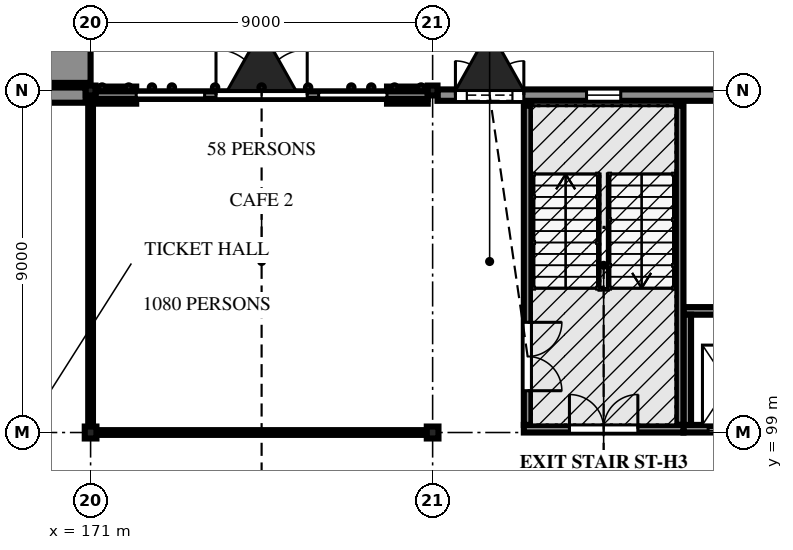
"""IFC4 building model, lengths in metres.
Left out: names, types, materials, properties, quantities, classifications, styles, units other than length and angle.
Written with IfcOpenShell. Run it as: python <this file> out.ifc"""

import sys

from ifc_helpers import new_model, si_unit, direction, frame, frame_2d, origin, origin_2d, place, context, subcontext, project, spatial, polyline, rectangle, i_section, outline, extrude, element, fill, save


model = new_model("IFC4")
c1 = context("Model", 3, precision=1e-05, world=origin(), true_north=direction((0.0, 1.0)))
c2 = subcontext(c1, "Body", "Model", "MODEL_VIEW")
j1 = project(units=[si_unit("LENGTHUNIT", "METRE"), si_unit("PLANEANGLEUNIT", "RADIAN")], contexts=[c1])
p1 = place(None, origin())
s1 = spatial("IfcSite", under=j1, at=p1, CompositionType="ELEMENT")
p2 = place(p1, origin())
s2 = spatial("IfcBuilding", under=s1, at=p2, CompositionType="ELEMENT")
p3 = place(p2, origin())
s3 = spatial("IfcBuildingStorey", under=s2, at=p3, CompositionType="ELEMENT", Elevation=0.0)
p4 = place(p3, frame((171.0, 99.0, -2.1), z_axis=(0.0, 0.0, 1.0), x_axis=(1.0, 0.0, 0.0)))
e1 = element("IfcColumn", 1, at=p4, inside=s3, PredefinedType="COLUMN", context=c2, shape_type="SweptSolid", body=[
    extrude(i_section(OverallWidth=0.307, OverallDepth=0.314, WebThickness=0.012, FlangeThickness=0.019, FilletRadius=0.015, at=origin_2d()), origin(), (0.0, 0.0, 1.0), 9.6),
])
p5 = place(p3, frame((171.0, 108.0, -2.1), z_axis=(0.0, 0.0, 1.0), x_axis=(1.0, 0.0, 0.0)))
e2 = element("IfcColumn", 2, at=p5, inside=s3, PredefinedType="COLUMN", context=c2, shape_type="SweptSolid", body=[
    extrude(i_section(OverallWidth=0.256, OverallDepth=0.26, WebThickness=0.01, FlangeThickness=0.017, FilletRadius=0.013, at=origin_2d()), origin(), (0.0, 0.0, 1.0), 9.6),
])
p6 = place(p3, frame((180.0, 99.0, -2.1), z_axis=(0.0, 0.0, 1.0), x_axis=(1.0, 0.0, 0.0)))
e3 = element("IfcColumn", 3, at=p6, inside=s3, PredefinedType="COLUMN", context=c2, shape_type="SweptSolid", body=[
    extrude(i_section(OverallWidth=0.307, OverallDepth=0.314, WebThickness=0.012, FlangeThickness=0.019, FilletRadius=0.015, at=origin_2d()), origin(), (0.0, 0.0, 1.0), 9.6),
])
p7 = place(p3, frame((180.0, 108.0, -2.1), z_axis=(0.0, 0.0, 1.0), x_axis=(1.0, 0.0, 0.0)))
e4 = element("IfcColumn", 4, at=p7, inside=s3, PredefinedType="COLUMN", context=c2, shape_type="SweptSolid", body=[
    extrude(i_section(OverallWidth=0.256, OverallDepth=0.26, WebThickness=0.01, FlangeThickness=0.017, FilletRadius=0.013, at=origin_2d()), origin(), (0.0, 0.0, 1.0), 9.6),
])
p8 = place(p3, frame((162.128, 107.878, 0.0), z_axis=(0.0, 0.0, 1.0), x_axis=(1.0, 0.0, 0.0)))
e5 = element("IfcWall", 5, at=p8, inside=s3, PredefinedType="SOLIDWALL", context=c2, shape_type="SweptSolid", body=[
    extrude(rectangle(XDim=8.744, YDim=0.4, at=frame_2d((4.372, 0.0))), origin(), (0.0, 0.0, 1.0), 7.5),
])
p9 = place(p8, frame((2.872, 0.0, 0.0)))
e6 = element("IfcOpeningElement", 6, at=p9, cuts=e5, PredefinedType="OPENING", context=c2, shape_type="SweptSolid", body=[
    extrude(rectangle(XDim=3.0, YDim=3.6, at=frame_2d((1.5, 1.8))), frame((0.0, 0.21, 0.0), z_axis=(0.0, -1.0, 0.0), x_axis=(1.0, 0.0, 0.0)), (0.0, 0.0, 1.0), 0.42),
])
p10 = place(p3, frame((171.128, 107.878, 0.0), z_axis=(0.0, 0.0, 1.0), x_axis=(1.0, 0.0, 0.0)))
e7 = element("IfcWall", 7, at=p10, inside=s3, PredefinedType="SOLIDWALL", context=c2, shape_type="SweptSolid", body=[
    extrude(rectangle(XDim=1.072, YDim=0.45, at=frame_2d((0.536, 0.0))), origin(), (0.0, 0.0, 1.0), 4.5),
])
p11 = place(p3, frame((174.0, 107.878, 0.0), z_axis=(0.0, 0.0, 1.0), x_axis=(1.0, 0.0, 0.0)))
e8 = element("IfcWall", 8, at=p11, inside=s3, PredefinedType="ELEMENTEDWALL", context=c2, shape_type="SweptSolid", body=[
    extrude(rectangle(XDim=3.0, YDim=0.15, at=frame_2d((1.5, 0.0))), origin(), (0.0, 0.0, 1.0), 4.5),
])
p12 = place(p11, frame((0.3, 0.0, 0.0)))
e9 = element("IfcOpeningElement", 9, at=p12, cuts=e8, PredefinedType="OPENING", context=c2, shape_type="SweptSolid", body=[
    extrude(rectangle(XDim=2.4, YDim=2.7, at=frame_2d((1.2, 1.35))), frame((0.0, 0.085, 0.0), z_axis=(0.0, -1.0, 0.0), x_axis=(1.0, 0.0, 0.0)), (0.0, 0.0, 1.0), 0.17),
])
p13 = place(p3, frame((178.8, 107.878, 0.0), z_axis=(0.0, 0.0, 1.0), x_axis=(1.0, 0.0, 0.0)))
e10 = element("IfcWall", 10, at=p13, inside=s3, PredefinedType="SOLIDWALL", context=c2, shape_type="SweptSolid", body=[
    extrude(rectangle(XDim=1.072, YDim=0.45, at=frame_2d((0.536, 0.0))), origin(), (0.0, 0.0, 1.0), 4.5),
])
p14 = place(p3, frame((171.128, 107.878, 4.9), z_axis=(0.0, 0.0, 1.0), x_axis=(1.0, 0.0, 0.0)))
e11 = element("IfcWall", 11, at=p14, inside=s3, PredefinedType="SOLIDWALL", context=c2, shape_type="SweptSolid", body=[
    extrude(rectangle(XDim=8.744, YDim=0.2, at=frame_2d((4.372, 0.0))), origin(), (0.0, 0.0, 1.0), 1.792),
])
p15 = place(p3, frame((180.128, 107.878, 0.0), z_axis=(0.0, 0.0, 1.0), x_axis=(1.0, 0.0, 0.0)))
e12 = element("IfcWall", 12, at=p15, inside=s3, PredefinedType="SOLIDWALL", context=c2, shape_type="SweptSolid", body=[
    extrude(rectangle(XDim=8.744, YDim=0.3, at=frame_2d((4.372, 0.0))), origin(), (0.0, 0.0, 1.0), 6.692),
])
p16 = place(p15, frame((0.472, 0.0, 0.0)))
e13 = element("IfcOpeningElement", 13, at=p16, cuts=e12, PredefinedType="OPENING", context=c2, shape_type="SweptSolid", body=[
    extrude(rectangle(XDim=1.8, YDim=2.4, at=frame_2d((0.9, 1.2))), frame((0.0, 0.16, 0.0), z_axis=(0.0, -1.0, 0.0), x_axis=(1.0, 0.0, 0.0)), (0.0, 0.0, 1.0), 0.32),
])
p17 = place(p15, frame((0.772, 0.0, 2.55)))
e14 = element("IfcOpeningElement", 14, at=p17, cuts=e12, PredefinedType="OPENING", context=c2, shape_type="SweptSolid", body=[
    extrude(rectangle(XDim=1.2, YDim=0.6, at=frame_2d((0.6, 0.3))), frame((0.0, 0.16, 0.0), z_axis=(0.0, -1.0, 0.0), x_axis=(1.0, 0.0, 0.0)), (0.0, 0.0, 1.0), 0.32),
])
p18 = place(p15, frame((3.922, 0.0, 1.2)))
e15 = element("IfcOpeningElement", 15, at=p18, cuts=e12, PredefinedType="OPENING", context=c2, shape_type="SweptSolid", body=[
    extrude(rectangle(XDim=0.9, YDim=1.8, at=frame_2d((0.45, 0.9))), frame((0.0, 0.16, 0.0), z_axis=(0.0, -1.0, 0.0), x_axis=(1.0, 0.0, 0.0)), (0.0, 0.0, 1.0), 0.32),
])
p19 = place(p3, frame((168.0, 108.7, -2.1), z_axis=(0.0, 0.0, 1.0), x_axis=(1.0, 0.0, 0.0)))
e16 = element("IfcWall", 16, at=p19, inside=s3, PredefinedType="SOLIDWALL", context=c2, shape_type="SweptSolid", body=[
    extrude(rectangle(XDim=3.0, YDim=1.0, at=frame_2d((1.5, 0.0))), origin(), (0.0, 0.0, 1.0), 26.1),
])
p20 = place(p3, frame((182.4, 99.1, 0.0), z_axis=(0.0, 0.0, 1.0), x_axis=(1.0, 0.0, 0.0)))
e17 = element("IfcWall", 17, at=p20, inside=s3, PredefinedType="SOLIDWALL", context=c2, shape_type="SweptSolid", body=[
    extrude(rectangle(XDim=4.2, YDim=0.2, at=frame_2d((2.1, 0.0))), origin(), (0.0, 0.0, 1.0), 6.757),
])
p21 = place(p20, frame((1.2, 0.0, 0.0)))
e18 = element("IfcOpeningElement", 18, at=p21, cuts=e17, PredefinedType="OPENING", context=c2, shape_type="SweptSolid", body=[
    extrude(rectangle(XDim=1.8, YDim=2.1, at=frame_2d((0.9, 1.05))), frame((0.0, 0.11, 0.0), z_axis=(0.0, -1.0, 0.0), x_axis=(1.0, 0.0, 0.0)), (0.0, 0.0, 1.0), 0.22),
])
p22 = place(p3, frame((182.5, 99.2, 0.0), z_axis=(0.0, 0.0, 1.0), x_axis=(0.0, 1.0, 0.0)))
e19 = element("IfcWall", 19, at=p22, inside=s3, PredefinedType="SOLIDWALL", context=c2, shape_type="SweptSolid", body=[
    extrude(rectangle(XDim=8.4, YDim=0.2, at=frame_2d((4.2, 0.0))), origin(), (0.0, 0.0, 1.0), 6.757),
])
p23 = place(p22, frame((0.9, 0.0, 0.0)))
e20 = element("IfcOpeningElement", 20, at=p23, cuts=e19, PredefinedType="OPENING", context=c2, shape_type="SweptSolid", body=[
    extrude(rectangle(XDim=1.8, YDim=2.1, at=frame_2d((0.9, 1.05))), frame((0.0, 0.11, 0.0), z_axis=(0.0, -1.0, 0.0), x_axis=(1.0, 0.0, 0.0)), (0.0, 0.0, 1.0), 0.22),
])
p24 = place(p3, frame((186.5, 99.2, 0.0), z_axis=(0.0, 0.0, 1.0), x_axis=(0.0, 1.0, 0.0)))
e21 = element("IfcWall", 21, at=p24, inside=s3, PredefinedType="SOLIDWALL", context=c2, shape_type="SweptSolid", body=[
    extrude(rectangle(XDim=8.4, YDim=0.2, at=frame_2d((4.2, 0.0))), origin(), (0.0, 0.0, 1.0), 6.757),
])
p25 = place(p3, frame((186.602, 99.1, -1.6), z_axis=(0.0, 0.0, 1.0), x_axis=(1.0, 0.0, 0.0)))
e22 = element("IfcWall", 22, at=p25, inside=s3, PredefinedType="SOLIDWALL", context=c2, shape_type="SweptSolid", body=[
    extrude(rectangle(XDim=2.398, YDim=0.2, at=frame_2d((1.199, 0.0))), origin(), (0.0, 0.0, 1.0), 8.357),
])
p26 = place(p25, frame((0.648, 0.0, 1.6)))
e23 = element("IfcOpeningElement", 23, at=p26, cuts=e22, PredefinedType="OPENING", context=c2, shape_type="SweptSolid", body=[
    extrude(rectangle(XDim=1.1, YDim=2.1, at=frame_2d((0.55, 1.05))), frame((0.0, 0.11, 0.0), z_axis=(0.0, -1.0, 0.0), x_axis=(1.0, 0.0, 0.0)), (0.0, 0.0, 1.0), 0.22),
])
p27 = place(p3, frame((186.602, 102.2, -1.6), z_axis=(0.0, 0.0, 1.0), x_axis=(1.0, 0.0, 0.0)))
e24 = element("IfcWall", 24, at=p27, inside=s3, PredefinedType="SOLIDWALL", context=c2, shape_type="SweptSolid", body=[
    extrude(rectangle(XDim=2.398, YDim=0.2, at=frame_2d((1.199, 0.0))), origin(), (0.0, 0.0, 1.0), 8.357),
])
p28 = place(p3, frame((186.7, 99.2, -1.6), z_axis=(0.0, 0.0, 1.0), x_axis=(0.0, 1.0, 0.0)))
e25 = element("IfcWall", 25, at=p28, inside=s3, PredefinedType="SOLIDWALL", context=c2, shape_type="SweptSolid", body=[
    extrude(rectangle(XDim=2.9, YDim=0.2, at=frame_2d((1.45, 0.0))), origin(), (0.0, 0.0, 1.0), 8.357),
])
p29 = place(p3, frame((171.154, 99.0, 0.0), z_axis=(0.0, 0.0, 1.0), x_axis=(1.0, 0.0, 0.0)))
e26 = element("IfcWall", 26, at=p29, inside=s3, PredefinedType="PARTITIONING", context=c2, shape_type="SweptSolid", body=[
    extrude(rectangle(XDim=8.692, YDim=0.125, at=frame_2d((4.346, 0.0))), origin(), (0.0, 0.0, 1.0), 6.757),
])
p30 = place(p3, frame((171.0, 107.87, 0.0), z_axis=(0.0, 0.0, 1.0), x_axis=(0.0, -1.0, 0.0)))
e27 = element("IfcWall", 27, at=p30, inside=s3, PredefinedType="PARTITIONING", context=c2, shape_type="SweptSolid", body=[
    extrude(rectangle(XDim=8.713, YDim=0.125, at=frame_2d((4.356, 0.0))), origin(), (0.0, 0.0, 1.0), 6.757),
])
p31 = place(p12, origin())
e28 = element("IfcDoor", 28, at=p31, inside=s3, OperationType="DOUBLE_DOOR_SINGLE_SWING", PredefinedType="DOOR", context=c2, shape_type="SweptSolid", body=[
    extrude(outline(polyline([(0.0, 0.0), (0.07, 0.0), (0.07, 2.63), (2.33, 2.63), (2.33, 0.0), (2.4, 0.0), (2.4, 2.7), (0.0, 2.7), (0.0, 0.0)])), frame((0.0, 0.025, 0.0), z_axis=(0.0, -1.0, 0.0), x_axis=(1.0, 0.0, 0.0)), (0.0, 0.0, 1.0), 0.05),
    extrude(outline(polyline([(0.074, 0.01), (1.197, 0.01), (1.197, 2.626), (0.074, 2.626), (0.074, 0.01)]), holes=[polyline([(0.164, 0.31), (1.107, 0.31), (1.107, 2.536), (0.164, 2.536), (0.164, 0.31)])]), frame((0.0, 0.017, 0.0), z_axis=(0.0, -1.0, 0.0), x_axis=(1.0, 0.0, 0.0)), (0.0, 0.0, 1.0), 0.035),
    extrude(rectangle(XDim=0.943, YDim=2.226, at=frame_2d((0.635, 1.423))), frame((0.0, 0.006, 0.0), z_axis=(0.0, -1.0, 0.0), x_axis=(1.0, 0.0, 0.0)), (0.0, 0.0, 1.0), 0.012),
    extrude(outline(polyline([(1.203, 0.01), (2.326, 0.01), (2.326, 2.626), (1.203, 2.626), (1.203, 0.01)]), holes=[polyline([(1.293, 0.31), (2.236, 0.31), (2.236, 2.536), (1.293, 2.536), (1.293, 0.31)])]), frame((0.0, 0.017, 0.0), z_axis=(0.0, -1.0, 0.0), x_axis=(1.0, 0.0, 0.0)), (0.0, 0.0, 1.0), 0.035),
    extrude(rectangle(XDim=0.943, YDim=2.226, at=frame_2d((1.764, 1.423))), frame((0.0, 0.006, 0.0), z_axis=(0.0, -1.0, 0.0), x_axis=(1.0, 0.0, 0.0)), (0.0, 0.0, 1.0), 0.012),
])
fill(e9, e28)
p32 = place(p16, origin())
e29 = element("IfcDoor", 29, at=p32, inside=s3, OperationType="DOUBLE_DOOR_SINGLE_SWING", PredefinedType="DOOR", context=c2, shape_type="SweptSolid", body=[
    extrude(outline(polyline([(0.0, 0.0), (0.07, 0.0), (0.07, 2.33), (1.73, 2.33), (1.73, 0.0), (1.8, 0.0), (1.8, 2.4), (0.0, 2.4), (0.0, 0.0)])), frame((0.0, 0.025, 0.0), z_axis=(0.0, -1.0, 0.0), x_axis=(1.0, 0.0, 0.0)), (0.0, 0.0, 1.0), 0.05),
    extrude(outline(polyline([(0.074, 0.01), (0.897, 0.01), (0.897, 2.326), (0.074, 2.326), (0.074, 0.01)]), holes=[polyline([(0.194, 0.16), (0.777, 0.16), (0.777, 1.01), (0.194, 1.01), (0.194, 0.16)]), polyline([(0.335, 1.16), (0.635, 1.16), (0.635, 1.76), (0.335, 1.76), (0.335, 1.16)])]), frame((0.0, 0.017, 0.0), z_axis=(0.0, -1.0, 0.0), x_axis=(1.0, 0.0, 0.0)), (0.0, 0.0, 1.0), 0.035),
    extrude(rectangle(XDim=0.583, YDim=0.85, at=frame_2d((0.485, 0.585))), frame((0.0, 0.009, 0.0), z_axis=(0.0, -1.0, 0.0), x_axis=(1.0, 0.0, 0.0)), (0.0, 0.0, 1.0), 0.017),
    extrude(rectangle(XDim=0.3, YDim=0.6, at=frame_2d((0.485, 1.46))), frame((0.0, 0.006, 0.0), z_axis=(0.0, -1.0, 0.0), x_axis=(1.0, 0.0, 0.0)), (0.0, 0.0, 1.0), 0.012),
    extrude(outline(polyline([(0.903, 0.01), (1.726, 0.01), (1.726, 2.326), (0.903, 2.326), (0.903, 0.01)]), holes=[polyline([(1.023, 0.16), (1.606, 0.16), (1.606, 1.01), (1.023, 1.01), (1.023, 0.16)]), polyline([(1.165, 1.16), (1.465, 1.16), (1.465, 1.76), (1.165, 1.76), (1.165, 1.16)])]), frame((0.0, 0.017, 0.0), z_axis=(0.0, -1.0, 0.0), x_axis=(1.0, 0.0, 0.0)), (0.0, 0.0, 1.0), 0.035),
    extrude(rectangle(XDim=0.583, YDim=0.85, at=frame_2d((1.314, 0.585))), frame((0.0, 0.009, 0.0), z_axis=(0.0, -1.0, 0.0), x_axis=(1.0, 0.0, 0.0)), (0.0, 0.0, 1.0), 0.017),
    extrude(rectangle(XDim=0.3, YDim=0.6, at=frame_2d((1.314, 1.46))), frame((0.0, 0.006, 0.0), z_axis=(0.0, -1.0, 0.0), x_axis=(1.0, 0.0, 0.0)), (0.0, 0.0, 1.0), 0.012),
])
fill(e13, e29)
p33 = place(p17, origin())
e30 = element("IfcWindow", 30, at=p33, inside=s3, PartitioningType="SINGLE_PANEL", PredefinedType="WINDOW", context=c2, shape_type="SweptSolid", body=[
    extrude(outline(polyline([(0.0, 0.0), (1.2, 0.0), (1.2, 0.6), (0.0, 0.6), (0.0, 0.0)]), holes=[polyline([(0.07, 0.07), (1.13, 0.07), (1.13, 0.53), (0.07, 0.53), (0.07, 0.07)])]), frame((0.0, 0.03, 0.0), z_axis=(0.0, -1.0, 0.0), x_axis=(1.0, 0.0, 0.0)), (0.0, 0.0, 1.0), 0.06),
    extrude(outline(polyline([(0.07, 0.07), (1.13, 0.07), (1.13, 0.53), (0.07, 0.53), (0.07, 0.07)]), holes=[polyline([(0.1, 0.1), (1.1, 0.1), (1.1, 0.5), (0.1, 0.5), (0.1, 0.1)])]), frame((0.0, 0.022, 0.0), z_axis=(0.0, -1.0, 0.0), x_axis=(1.0, 0.0, 0.0)), (0.0, 0.0, 1.0), 0.045),
    extrude(rectangle(XDim=1.0, YDim=0.4, at=frame_2d((0.6, 0.3))), frame((0.0, 0.006, 0.0), z_axis=(0.0, -1.0, 0.0), x_axis=(1.0, 0.0, 0.0)), (0.0, 0.0, 1.0), 0.012),
])
fill(e14, e30)
p34 = place(p18, origin())
e31 = element("IfcWindow", 31, at=p34, inside=s3, PartitioningType="SINGLE_PANEL", PredefinedType="WINDOW", context=c2, shape_type="SweptSolid", body=[
    extrude(outline(polyline([(0.0, 0.0), (0.9, 0.0), (0.9, 1.8), (0.0, 1.8), (0.0, 0.0)]), holes=[polyline([(0.07, 0.07), (0.83, 0.07), (0.83, 1.73), (0.07, 1.73), (0.07, 0.07)])]), frame((0.0, 0.03, 0.0), z_axis=(0.0, -1.0, 0.0), x_axis=(1.0, 0.0, 0.0)), (0.0, 0.0, 1.0), 0.06),
    extrude(outline(polyline([(0.07, 0.07), (0.83, 0.07), (0.83, 1.73), (0.07, 1.73), (0.07, 0.07)]), holes=[polyline([(0.1, 0.1), (0.8, 0.1), (0.8, 1.7), (0.1, 1.7), (0.1, 0.1)])]), frame((0.0, 0.022, 0.0), z_axis=(0.0, -1.0, 0.0), x_axis=(1.0, 0.0, 0.0)), (0.0, 0.0, 1.0), 0.045),
    extrude(rectangle(XDim=0.7, YDim=1.6, at=frame_2d((0.45, 0.9))), frame((0.0, 0.006, 0.0), z_axis=(0.0, -1.0, 0.0), x_axis=(1.0, 0.0, 0.0)), (0.0, 0.0, 1.0), 0.012),
])
fill(e15, e31)
p35 = place(p26, origin())
e32 = element("IfcDoor", 32, at=p35, inside=s3, OperationType="SLIDING_TO_LEFT", PredefinedType="DOOR", context=c2, shape_type="SweptSolid", body=[
    extrude(outline(polyline([(0.0, 0.0), (0.07, 0.0), (0.07, 2.03), (1.03, 2.03), (1.03, 0.0), (1.1, 0.0), (1.1, 2.1), (0.0, 2.1), (0.0, 0.0)])), frame((0.0, 0.025, 0.0), z_axis=(0.0, -1.0, 0.0), x_axis=(1.0, 0.0, 0.0)), (0.0, 0.0, 1.0), 0.05),
    extrude(rectangle(XDim=0.524, YDim=2.016, at=frame_2d((0.336, 1.018))), frame((0.0, 0.018, 0.0), z_axis=(0.0, -1.0, 0.0), x_axis=(1.0, 0.0, 0.0)), (0.0, 0.0, 1.0), 0.016),
    extrude(rectangle(XDim=0.52, YDim=2.016, at=frame_2d((0.766, 1.018))), frame((0.0, -0.002, 0.0), z_axis=(0.0, -1.0, 0.0), x_axis=(1.0, 0.0, 0.0)), (0.0, 0.0, 1.0), 0.016),
])
fill(e23, e32)
p36 = place(p23, frame((1.8, 0.0, 0.0), z_axis=(0.0, 0.0, 1.0), x_axis=(-1.0, 0.0, 0.0)))
e33 = element("IfcDoor", 33, at=p36, inside=s3, OperationType="DOUBLE_DOOR_SINGLE_SWING", PredefinedType="DOOR", context=c2, shape_type="SweptSolid", body=[
    extrude(outline(polyline([(0.0, 0.0), (0.07, 0.0), (0.07, 2.03), (1.73, 2.03), (1.73, 0.0), (1.8, 0.0), (1.8, 2.1), (0.0, 2.1), (0.0, 0.0)])), frame((0.0, 0.025, 0.0), z_axis=(0.0, -1.0, 0.0), x_axis=(1.0, 0.0, 0.0)), (0.0, 0.0, 1.0), 0.05),
    extrude(outline(polyline([(0.074, 0.01), (0.897, 0.01), (0.897, 2.026), (0.074, 2.026), (0.074, 0.01)]), holes=[polyline([(0.194, 0.16), (0.777, 0.16), (0.777, 1.01), (0.194, 1.01), (0.194, 0.16)]), polyline([(0.335, 1.16), (0.635, 1.16), (0.635, 1.76), (0.335, 1.76), (0.335, 1.16)])]), frame((0.0, 0.017, 0.0), z_axis=(0.0, -1.0, 0.0), x_axis=(1.0, 0.0, 0.0)), (0.0, 0.0, 1.0), 0.035),
    extrude(rectangle(XDim=0.583, YDim=0.85, at=frame_2d((0.485, 0.585))), frame((0.0, 0.009, 0.0), z_axis=(0.0, -1.0, 0.0), x_axis=(1.0, 0.0, 0.0)), (0.0, 0.0, 1.0), 0.017),
    extrude(rectangle(XDim=0.3, YDim=0.6, at=frame_2d((0.485, 1.46))), frame((0.0, 0.006, 0.0), z_axis=(0.0, -1.0, 0.0), x_axis=(1.0, 0.0, 0.0)), (0.0, 0.0, 1.0), 0.012),
    extrude(outline(polyline([(0.903, 0.01), (1.726, 0.01), (1.726, 2.026), (0.903, 2.026), (0.903, 0.01)]), holes=[polyline([(1.023, 0.16), (1.606, 0.16), (1.606, 1.01), (1.023, 1.01), (1.023, 0.16)]), polyline([(1.165, 1.16), (1.465, 1.16), (1.465, 1.76), (1.165, 1.76), (1.165, 1.16)])]), frame((0.0, 0.017, 0.0), z_axis=(0.0, -1.0, 0.0), x_axis=(1.0, 0.0, 0.0)), (0.0, 0.0, 1.0), 0.035),
    extrude(rectangle(XDim=0.583, YDim=0.85, at=frame_2d((1.314, 0.585))), frame((0.0, 0.009, 0.0), z_axis=(0.0, -1.0, 0.0), x_axis=(1.0, 0.0, 0.0)), (0.0, 0.0, 1.0), 0.017),
    extrude(rectangle(XDim=0.3, YDim=0.6, at=frame_2d((1.314, 1.46))), frame((0.0, 0.006, 0.0), z_axis=(0.0, -1.0, 0.0), x_axis=(1.0, 0.0, 0.0)), (0.0, 0.0, 1.0), 0.012),
])
fill(e20, e33)
p37 = place(p21, origin())
e34 = element("IfcDoor", 34, at=p37, inside=s3, OperationType="DOUBLE_DOOR_SINGLE_SWING", PredefinedType="DOOR", context=c2, shape_type="SweptSolid", body=[
    extrude(outline(polyline([(0.0, 0.0), (0.07, 0.0), (0.07, 2.03), (1.73, 2.03), (1.73, 0.0), (1.8, 0.0), (1.8, 2.1), (0.0, 2.1), (0.0, 0.0)])), frame((0.0, 0.025, 0.0), z_axis=(0.0, -1.0, 0.0), x_axis=(1.0, 0.0, 0.0)), (0.0, 0.0, 1.0), 0.05),
    extrude(outline(polyline([(0.074, 0.01), (0.897, 0.01), (0.897, 2.026), (0.074, 2.026), (0.074, 0.01)]), holes=[polyline([(0.194, 0.16), (0.777, 0.16), (0.777, 1.01), (0.194, 1.01), (0.194, 0.16)]), polyline([(0.335, 1.16), (0.635, 1.16), (0.635, 1.76), (0.335, 1.76), (0.335, 1.16)])]), frame((0.0, 0.017, 0.0), z_axis=(0.0, -1.0, 0.0), x_axis=(1.0, 0.0, 0.0)), (0.0, 0.0, 1.0), 0.035),
    extrude(rectangle(XDim=0.583, YDim=0.85, at=frame_2d((0.485, 0.585))), frame((0.0, 0.009, 0.0), z_axis=(0.0, -1.0, 0.0), x_axis=(1.0, 0.0, 0.0)), (0.0, 0.0, 1.0), 0.017),
    extrude(rectangle(XDim=0.3, YDim=0.6, at=frame_2d((0.485, 1.46))), frame((0.0, 0.006, 0.0), z_axis=(0.0, -1.0, 0.0), x_axis=(1.0, 0.0, 0.0)), (0.0, 0.0, 1.0), 0.012),
    extrude(outline(polyline([(0.903, 0.01), (1.726, 0.01), (1.726, 2.026), (0.903, 2.026), (0.903, 0.01)]), holes=[polyline([(1.023, 0.16), (1.606, 0.16), (1.606, 1.01), (1.023, 1.01), (1.023, 0.16)]), polyline([(1.165, 1.16), (1.465, 1.16), (1.465, 1.76), (1.165, 1.76), (1.165, 1.16)])]), frame((0.0, 0.017, 0.0), z_axis=(0.0, -1.0, 0.0), x_axis=(1.0, 0.0, 0.0)), (0.0, 0.0, 1.0), 0.035),
    extrude(rectangle(XDim=0.583, YDim=0.85, at=frame_2d((1.314, 0.585))), frame((0.0, 0.009, 0.0), z_axis=(0.0, -1.0, 0.0), x_axis=(1.0, 0.0, 0.0)), (0.0, 0.0, 1.0), 0.017),
    extrude(rectangle(XDim=0.3, YDim=0.6, at=frame_2d((1.314, 1.46))), frame((0.0, 0.006, 0.0), z_axis=(0.0, -1.0, 0.0), x_axis=(1.0, 0.0, 0.0)), (0.0, 0.0, 1.0), 0.012),
])
fill(e18, e34)
save(model, sys.argv[1])
